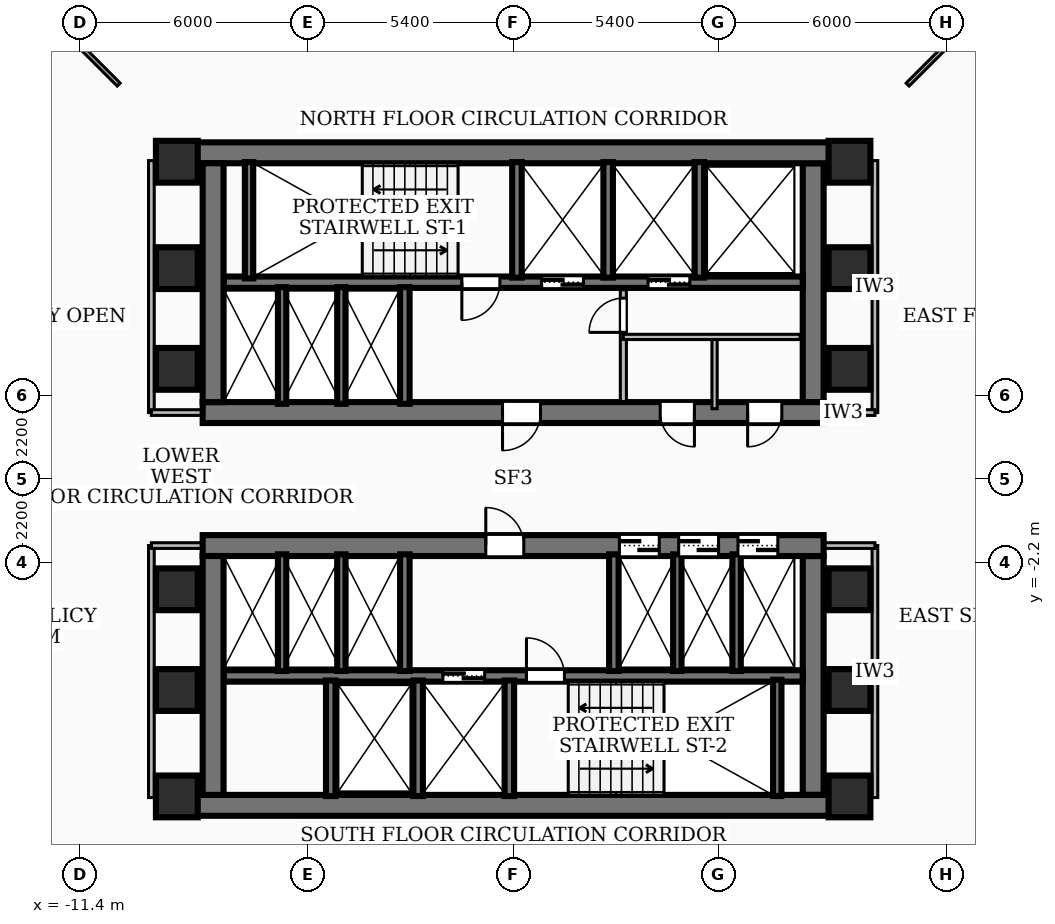
"""IFC4 building model, lengths in metres.
Left out: names, types, materials, properties, quantities, classifications, styles, units other than length and angle.
Written with IfcOpenShell. Run it as: python <this file> out.ifc"""

import sys

from ifc_helpers import new_model, si_unit, direction, frame, frame_2d, origin, origin_2d, place, context, subcontext, project, spatial, rectangle, extrude, element, fill, save


model = new_model("IFC4")
c1 = context("Model", 3, precision=1e-05, world=origin(), true_north=direction((0.0, 1.0)))
c2 = subcontext(c1, "Body", "Model", "MODEL_VIEW")
j1 = project(units=[si_unit("LENGTHUNIT", "METRE"), si_unit("PLANEANGLEUNIT", "RADIAN")], contexts=[c1])
p1 = place(None, origin())
s1 = spatial("IfcSite", under=j1, at=p1, CompositionType="ELEMENT")
p2 = place(p1, origin())
s2 = spatial("IfcBuilding", under=s1, at=p2, CompositionType="ELEMENT")
p3 = place(p2, frame((0.0, 0.0, 31.68)))
s3 = spatial("IfcBuildingStorey", under=s2, at=p3, CompositionType="ELEMENT", Elevation=31.68)
p4 = place(p3, frame((-8.78, 8.585, 0.0), z_axis=(0.0, 0.0, 1.0), x_axis=(1.0, 0.0, 0.0)))
e1 = element("IfcWall", 1, at=p4, inside=s3, PredefinedType="SHEAR", context=c2, shape_type="SweptSolid", body=[
    extrude(rectangle(XDim=17.56, YDim=0.55, at=frame_2d((8.78, 0.0))), origin(), (0.0, 0.0, 1.0), 3.34),
])
p5 = place(p3, frame((8.17, 1.75, 0.0), z_axis=(0.0, 0.0, 1.0), x_axis=(-1.0, 0.0, 0.0)))
e2 = element("IfcWall", 2, at=p5, inside=s3, PredefinedType="SHEAR", context=c2, shape_type="SweptSolid", body=[
    extrude(rectangle(XDim=16.34, YDim=0.55, at=frame_2d((8.17, 0.0))), origin(), (0.0, 0.0, 1.0), 3.34),
])
p6 = place(p5, frame((7.45, 0.0, 0.0)))
e3 = element("IfcOpeningElement", 3, at=p6, cuts=e2, PredefinedType="OPENING", context=c2, shape_type="SweptSolid", body=[
    extrude(rectangle(XDim=1.0, YDim=2.1, at=frame_2d((0.5, 1.05))), frame((0.0, 0.285, 0.0), z_axis=(0.0, -1.0, 0.0), x_axis=(1.0, 0.0, 0.0)), (0.0, 0.0, 1.0), 0.57),
])
p7 = place(p5, frame((3.4, 0.0, 0.0)))
e4 = element("IfcOpeningElement", 4, at=p7, cuts=e2, PredefinedType="OPENING", context=c2, shape_type="SweptSolid", body=[
    extrude(rectangle(XDim=0.9, YDim=2.06, at=frame_2d((0.45, 1.03))), frame((0.0, 0.285, 0.0), z_axis=(0.0, -1.0, 0.0), x_axis=(1.0, 0.0, 0.0)), (0.0, 0.0, 1.0), 0.57),
])
p8 = place(p5, frame((1.1, 0.0, 0.0)))
e5 = element("IfcOpeningElement", 5, at=p8, cuts=e2, PredefinedType="OPENING", context=c2, shape_type="SweptSolid", body=[
    extrude(rectangle(XDim=0.9, YDim=2.06, at=frame_2d((0.45, 1.03))), frame((0.0, 0.285, 0.0), z_axis=(0.0, -1.0, 0.0), x_axis=(1.0, 0.0, 0.0)), (0.0, 0.0, 1.0), 0.57),
])
for number, where, z_axis, x_axis in (
    (6, (-7.895, 2.025, 0.0), (0.0, 0.0, 1.0), (0.0, 1.0, 0.0)),
    (7, (7.895, 8.31, 0.0), (0.0, 0.0, 1.0), (0.0, -1.0, 0.0)),
):
    element("IfcWall", number, at=place(p3, frame(where, z_axis=z_axis, x_axis=x_axis)), inside=s3, PredefinedType="SHEAR", context=c2, shape_type="SweptSolid", body=[
        extrude(rectangle(XDim=6.285, YDim=0.55, at=frame_2d((3.143, 0.0))), origin(), (0.0, 0.0, 1.0), 3.34),
    ])
p9 = place(p3, frame((7.62, 5.18, 0.0), z_axis=(0.0, 0.0, 1.0), x_axis=(-1.0, 0.0, 0.0)))
e8 = element("IfcWall", 8, at=p9, inside=s3, PredefinedType="SOLIDWALL", context=c2, shape_type="SweptSolid", body=[
    extrude(rectangle(XDim=15.24, YDim=0.3, at=frame_2d((7.62, 0.0))), origin(), (0.0, 0.0, 1.0), 3.34),
])
p10 = place(p9, frame((5.77, 0.0, 0.0)))
e9 = element("IfcOpeningElement", 9, at=p10, cuts=e8, PredefinedType="OPENING", context=c2, shape_type="SweptSolid", body=[
    extrude(rectangle(XDim=1.1, YDim=2.15, at=frame_2d((0.55, 1.075))), frame((0.0, 0.16, 0.0), z_axis=(0.0, -1.0, 0.0), x_axis=(1.0, 0.0, 0.0)), (0.0, 0.0, 1.0), 0.32),
])
p11 = place(p9, frame((2.97, 0.0, 0.0)))
e10 = element("IfcOpeningElement", 10, at=p11, cuts=e8, PredefinedType="OPENING", context=c2, shape_type="SweptSolid", body=[
    extrude(rectangle(XDim=1.1, YDim=2.15, at=frame_2d((0.55, 1.075))), frame((0.0, 0.16, 0.0), z_axis=(0.0, -1.0, 0.0), x_axis=(1.0, 0.0, 0.0)), (0.0, 0.0, 1.0), 0.32),
])
p12 = place(p9, frame((7.97, 0.0, 0.0)))
e11 = element("IfcOpeningElement", 11, at=p12, cuts=e8, PredefinedType="OPENING", context=c2, shape_type="SweptSolid", body=[
    extrude(rectangle(XDim=1.0, YDim=2.1, at=frame_2d((0.5, 1.05))), frame((0.0, 0.16, 0.0), z_axis=(0.0, -1.0, 0.0), x_axis=(1.0, 0.0, 0.0)), (0.0, 0.0, 1.0), 0.32),
])
p13 = place(p3, frame((8.78, -8.585, 0.0), z_axis=(0.0, 0.0, 1.0), x_axis=(-1.0, 0.0, 0.0)))
e12 = element("IfcWall", 12, at=p13, inside=s3, PredefinedType="SHEAR", context=c2, shape_type="SweptSolid", body=[
    extrude(rectangle(XDim=17.56, YDim=0.55, at=frame_2d((8.78, 0.0))), origin(), (0.0, 0.0, 1.0), 3.34),
])
p14 = place(p3, frame((-8.17, -1.75, 0.0), z_axis=(0.0, 0.0, 1.0), x_axis=(1.0, 0.0, 0.0)))
e13 = element("IfcWall", 13, at=p14, inside=s3, PredefinedType="SHEAR", context=c2, shape_type="SweptSolid", body=[
    extrude(rectangle(XDim=16.34, YDim=0.55, at=frame_2d((8.17, 0.0))), origin(), (0.0, 0.0, 1.0), 3.34),
])
p15 = place(p14, frame((7.45, 0.0, 0.0)))
e14 = element("IfcOpeningElement", 14, at=p15, cuts=e13, PredefinedType="OPENING", context=c2, shape_type="SweptSolid", body=[
    extrude(rectangle(XDim=1.0, YDim=2.1, at=frame_2d((0.5, 1.05))), frame((0.0, 0.285, 0.0), z_axis=(0.0, -1.0, 0.0), x_axis=(1.0, 0.0, 0.0)), (0.0, 0.0, 1.0), 0.57),
])
p16 = place(p14, frame((10.965, 0.0, 0.0)))
e15 = element("IfcOpeningElement", 15, at=p16, cuts=e13, PredefinedType="OPENING", context=c2, shape_type="SweptSolid", body=[
    extrude(rectangle(XDim=1.05, YDim=2.15, at=frame_2d((0.525, 1.075))), frame((0.0, 0.285, 0.0), z_axis=(0.0, -1.0, 0.0), x_axis=(1.0, 0.0, 0.0)), (0.0, 0.0, 1.0), 0.57),
])
p17 = place(p14, frame((12.525, 0.0, 0.0)))
e16 = element("IfcOpeningElement", 16, at=p17, cuts=e13, PredefinedType="OPENING", context=c2, shape_type="SweptSolid", body=[
    extrude(rectangle(XDim=1.05, YDim=2.15, at=frame_2d((0.525, 1.075))), frame((0.0, 0.285, 0.0), z_axis=(0.0, -1.0, 0.0), x_axis=(1.0, 0.0, 0.0)), (0.0, 0.0, 1.0), 0.57),
])
p18 = place(p14, frame((14.085, 0.0, 0.0)))
e17 = element("IfcOpeningElement", 17, at=p18, cuts=e13, PredefinedType="OPENING", context=c2, shape_type="SweptSolid", body=[
    extrude(rectangle(XDim=1.05, YDim=2.15, at=frame_2d((0.525, 1.075))), frame((0.0, 0.285, 0.0), z_axis=(0.0, -1.0, 0.0), x_axis=(1.0, 0.0, 0.0)), (0.0, 0.0, 1.0), 0.57),
])
for number, where, z_axis, x_axis in (
    (18, (-7.895, -8.31, 0.0), (0.0, 0.0, 1.0), (0.0, 1.0, 0.0)),
    (19, (7.895, -2.025, 0.0), (0.0, 0.0, 1.0), (0.0, -1.0, 0.0)),
):
    element("IfcWall", number, at=place(p3, frame(where, z_axis=z_axis, x_axis=x_axis)), inside=s3, PredefinedType="SHEAR", context=c2, shape_type="SweptSolid", body=[
        extrude(rectangle(XDim=6.285, YDim=0.55, at=frame_2d((3.143, 0.0))), origin(), (0.0, 0.0, 1.0), 3.34),
    ])
p19 = place(p3, frame((-7.62, -5.18, 0.0), z_axis=(0.0, 0.0, 1.0), x_axis=(1.0, 0.0, 0.0)))
e20 = element("IfcWall", 20, at=p19, inside=s3, PredefinedType="SOLIDWALL", context=c2, shape_type="SweptSolid", body=[
    extrude(rectangle(XDim=15.24, YDim=0.3, at=frame_2d((7.62, 0.0))), origin(), (0.0, 0.0, 1.0), 3.34),
])
p20 = place(p19, frame((5.77, 0.0, 0.0)))
e21 = element("IfcOpeningElement", 21, at=p20, cuts=e20, PredefinedType="OPENING", context=c2, shape_type="SweptSolid", body=[
    extrude(rectangle(XDim=1.1, YDim=2.15, at=frame_2d((0.55, 1.075))), frame((0.0, 0.16, 0.0), z_axis=(0.0, -1.0, 0.0), x_axis=(1.0, 0.0, 0.0)), (0.0, 0.0, 1.0), 0.32),
])
p21 = place(p19, frame((7.97, 0.0, 0.0)))
e22 = element("IfcOpeningElement", 22, at=p21, cuts=e20, PredefinedType="OPENING", context=c2, shape_type="SweptSolid", body=[
    extrude(rectangle(XDim=1.0, YDim=2.1, at=frame_2d((0.5, 1.05))), frame((0.0, 0.16, 0.0), z_axis=(0.0, -1.0, 0.0), x_axis=(1.0, 0.0, 0.0)), (0.0, 0.0, 1.0), 0.32),
])
for number, where, z_axis, x_axis in (
    (23, (-6.95, 5.28, 0.0), (0.0, 0.0, 1.0), (0.0, 1.0, 0.0)),
    (24, (6.95, -8.34, 0.0), (0.0, 0.0, 1.0), (0.0, 1.0, 0.0)),
):
    element("IfcWall", number, at=place(p3, frame(where, z_axis=z_axis, x_axis=x_axis)), inside=s3, PredefinedType="SOLIDWALL", context=c2, shape_type="SweptSolid", body=[
        extrude(rectangle(XDim=3.06, YDim=0.22, at=frame_2d((1.53, 0.0))), origin(), (0.0, 0.0, 1.0), 3.34),
    ])
for number, where, z_axis, x_axis in (
    (25, (0.1, 5.3, 0.0), (0.0, 0.0, 1.0), (0.0, 1.0, 0.0)),
    (26, (2.5, 5.3, 0.0), (0.0, 0.0, 1.0), (0.0, 1.0, 0.0)),
    (27, (4.9, 5.3, 0.0), (0.0, 0.0, 1.0), (0.0, 1.0, 0.0)),
):
    element("IfcWall", number, at=place(p3, frame(where, z_axis=z_axis, x_axis=x_axis)), inside=s3, PredefinedType="SOLIDWALL", context=c2, shape_type="SweptSolid", body=[
        extrude(rectangle(XDim=3.04, YDim=0.25, at=frame_2d((1.52, 0.0))), origin(), (0.0, 0.0, 1.0), 3.34),
    ])
p22 = place(p3, frame((-2.85, 1.98, 0.0), z_axis=(0.0, 0.0, 1.0), x_axis=(0.0, 1.0, 0.0)))
e28 = element("IfcWall", 28, at=p22, inside=s3, PredefinedType="SOLIDWALL", context=c2, shape_type="SweptSolid", body=[
    extrude(rectangle(XDim=3.07, YDim=0.25, at=frame_2d((1.535, 0.0))), origin(), (0.0, 0.0, 1.0), 3.34),
])
for number, where, z_axis, x_axis in (
    (29, (-0.1, -8.34, 0.0), (0.0, 0.0, 1.0), (0.0, 1.0, 0.0)),
    (30, (-2.5, -8.34, 0.0), (0.0, 0.0, 1.0), (0.0, 1.0, 0.0)),
    (31, (-4.8, -8.34, 0.0), (0.0, 0.0, 1.0), (0.0, 1.0, 0.0)),
):
    element("IfcWall", number, at=place(p3, frame(where, z_axis=z_axis, x_axis=x_axis)), inside=s3, PredefinedType="SOLIDWALL", context=c2, shape_type="SweptSolid", body=[
        extrude(rectangle(XDim=3.04, YDim=0.25, at=frame_2d((1.52, 0.0))), origin(), (0.0, 0.0, 1.0), 3.34),
    ])
for number, where, z_axis, x_axis in (
    (32, (-2.85, -5.05, 0.0), (0.0, 0.0, 1.0), (0.0, 1.0, 0.0)),
    (33, (2.65, -5.05, 0.0), (0.0, 0.0, 1.0), (0.0, 1.0, 0.0)),
):
    element("IfcWall", number, at=place(p3, frame(where, z_axis=z_axis, x_axis=x_axis)), inside=s3, PredefinedType="SOLIDWALL", context=c2, shape_type="SweptSolid", body=[
        extrude(rectangle(XDim=3.07, YDim=0.25, at=frame_2d((1.535, 0.0))), origin(), (0.0, 0.0, 1.0), 3.34),
    ])
for number, where, z_axis, x_axis in (
    (34, (-6.08, 1.98, 0.0), (0.0, 0.0, 1.0), (0.0, 1.0, 0.0)),
    (35, (-4.52, 1.98, 0.0), (0.0, 0.0, 1.0), (0.0, 1.0, 0.0)),
    (36, (4.32, -5.05, 0.0), (0.0, 0.0, 1.0), (0.0, 1.0, 0.0)),
    (37, (5.88, -5.05, 0.0), (0.0, 0.0, 1.0), (0.0, 1.0, 0.0)),
    (38, (-6.08, -5.05, 0.0), (0.0, 0.0, 1.0), (0.0, 1.0, 0.0)),
    (39, (-4.52, -5.05, 0.0), (0.0, 0.0, 1.0), (0.0, 1.0, 0.0)),
):
    element("IfcWall", number, at=place(p3, frame(where, z_axis=z_axis, x_axis=x_axis)), inside=s3, PredefinedType="SOLIDWALL", context=c2, shape_type="SweptSolid", body=[
        extrude(rectangle(XDim=3.07, YDim=0.22, at=frame_2d((1.535, 0.0))), origin(), (0.0, 0.0, 1.0), 3.34),
    ])
for number, where, z_axis, x_axis in (
    (40, (-8.85, -5.55, 0.0), (0.0, 0.0, 1.0), (1.0, 0.0, 0.0)),
    (41, (-8.85, -2.9, 0.0), (0.0, 0.0, 1.0), (1.0, 0.0, 0.0)),
    (42, (-8.85, 2.9, 0.0), (0.0, 0.0, 1.0), (1.0, 0.0, 0.0)),
    (43, (-8.85, 5.55, 0.0), (0.0, 0.0, 1.0), (1.0, 0.0, 0.0)),
    (44, (8.85, -5.55, 0.0), (0.0, 0.0, 1.0), (1.0, 0.0, 0.0)),
    (45, (8.85, -2.9, 0.0), (0.0, 0.0, 1.0), (1.0, 0.0, 0.0)),
    (46, (8.85, 2.9, 0.0), (0.0, 0.0, 1.0), (1.0, 0.0, 0.0)),
    (47, (8.85, 5.55, 0.0), (0.0, 0.0, 1.0), (1.0, 0.0, 0.0)),
    (48, (-8.85, 8.35, 0.0), (0.0, 0.0, 1.0), (1.0, 0.0, 0.0)),
    (49, (8.85, -8.35, 0.0), (0.0, 0.0, 1.0), (1.0, 0.0, 0.0)),
    (50, (8.85, 8.35, 0.0), (0.0, 0.0, 1.0), (1.0, 0.0, 0.0)),
    (51, (-8.85, -8.35, 0.0), (0.0, 0.0, 1.0), (1.0, 0.0, 0.0)),
):
    element("IfcColumn", number, at=place(p3, frame(where, z_axis=z_axis, x_axis=x_axis)), inside=s3, PredefinedType="COLUMN", context=c2, shape_type="SweptSolid", body=[
        extrude(rectangle(XDim=1.1, YDim=1.1, at=origin_2d()), origin(), (0.0, 0.0, 1.0), 3.6),
    ])
p23 = place(p3, frame((2.9, 2.04, 0.0), z_axis=(0.0, 0.0, 1.0), x_axis=(0.0, 1.0, 0.0)))
e52 = element("IfcWall", 52, at=p23, inside=s3, PredefinedType="PARTITIONING", context=c2, shape_type="SweptSolid", body=[
    extrude(rectangle(XDim=2.94, YDim=0.16, at=frame_2d((1.47, 0.0))), origin(), (0.0, 0.0, 1.0), 2.405),
])
p24 = place(p23, frame((1.82, 0.0, 0.0)))
e53 = element("IfcOpeningElement", 53, at=p24, cuts=e52, PredefinedType="OPENING", context=c2, shape_type="SweptSolid", body=[
    extrude(rectangle(XDim=0.9, YDim=2.06, at=frame_2d((0.45, 1.03))), frame((0.0, 0.09, 0.0), z_axis=(0.0, -1.0, 0.0), x_axis=(1.0, 0.0, 0.0)), (0.0, 0.0, 1.0), 0.18),
])
p25 = place(p3, frame((2.9, 3.74, 0.0), z_axis=(0.0, 0.0, 1.0), x_axis=(1.0, 0.0, 0.0)))
e54 = element("IfcWall", 54, at=p25, inside=s3, PredefinedType="PARTITIONING", context=c2, shape_type="SweptSolid", body=[
    extrude(rectangle(XDim=4.65, YDim=0.138, at=frame_2d((2.325, 0.0))), origin(), (0.0, 0.0, 1.0), 3.34),
])
p26 = place(p3, frame((5.3, 1.85, 0.0), z_axis=(0.0, 0.0, 1.0), x_axis=(0.0, 1.0, 0.0)))
e55 = element("IfcWall", 55, at=p26, inside=s3, PredefinedType="PARTITIONING", context=c2, shape_type="SweptSolid", body=[
    extrude(rectangle(XDim=1.89, YDim=0.138, at=frame_2d((0.945, 0.0))), origin(), (0.0, 0.0, 1.0), 2.405),
])
p27 = place(p3, frame((-9.52, 1.75, 0.0), z_axis=(0.0, 0.0, 1.0), x_axis=(0.0, 1.0, 0.0)))
e56 = element("IfcWall", 56, at=p27, inside=s3, PredefinedType="PARTITIONING", context=c2, shape_type="SweptSolid", body=[
    extrude(rectangle(XDim=6.63, YDim=0.15, at=frame_2d((3.315, 0.0))), origin(), (0.0, 0.0, 1.0), 2.421),
])
p28 = place(p3, frame((-7.85, 1.75, 0.0), z_axis=(0.0, 0.0, 1.0), x_axis=(-1.0, 0.0, 0.0)))
e57 = element("IfcWall", 57, at=p28, inside=s3, PredefinedType="PARTITIONING", context=c2, shape_type="SweptSolid", body=[
    extrude(rectangle(XDim=1.67, YDim=0.15, at=frame_2d((0.835, 0.0))), origin(), (0.0, 0.0, 1.0), 2.405),
])
p29 = place(p3, frame((-9.52, -8.38, 0.0), z_axis=(0.0, 0.0, 1.0), x_axis=(0.0, 1.0, 0.0)))
e58 = element("IfcWall", 58, at=p29, inside=s3, PredefinedType="PARTITIONING", context=c2, shape_type="SweptSolid", body=[
    extrude(rectangle(XDim=6.63, YDim=0.15, at=frame_2d((3.315, 0.0))), origin(), (0.0, 0.0, 1.0), 2.421),
])
p30 = place(p3, frame((-7.85, -1.75, 0.0), z_axis=(0.0, 0.0, 1.0), x_axis=(-1.0, 0.0, 0.0)))
e59 = element("IfcWall", 59, at=p30, inside=s3, PredefinedType="PARTITIONING", context=c2, shape_type="SweptSolid", body=[
    extrude(rectangle(XDim=1.67, YDim=0.15, at=frame_2d((0.835, 0.0))), origin(), (0.0, 0.0, 1.0), 2.405),
])
p31 = place(p3, frame((9.52, 1.75, 0.0), z_axis=(0.0, 0.0, 1.0), x_axis=(0.0, 1.0, 0.0)))
e60 = element("IfcWall", 60, at=p31, inside=s3, PredefinedType="PARTITIONING", context=c2, shape_type="SweptSolid", body=[
    extrude(rectangle(XDim=6.63, YDim=0.15, at=frame_2d((3.315, 0.0))), origin(), (0.0, 0.0, 1.0), 2.421),
])
p32 = place(p3, frame((7.85, 1.75, 0.0), z_axis=(0.0, 0.0, 1.0), x_axis=(1.0, 0.0, 0.0)))
e61 = element("IfcWall", 61, at=p32, inside=s3, PredefinedType="PARTITIONING", context=c2, shape_type="SweptSolid", body=[
    extrude(rectangle(XDim=1.67, YDim=0.15, at=frame_2d((0.835, 0.0))), origin(), (0.0, 0.0, 1.0), 2.405),
])
p33 = place(p3, frame((9.52, -8.38, 0.0), z_axis=(0.0, 0.0, 1.0), x_axis=(0.0, 1.0, 0.0)))
e62 = element("IfcWall", 62, at=p33, inside=s3, PredefinedType="PARTITIONING", context=c2, shape_type="SweptSolid", body=[
    extrude(rectangle(XDim=6.63, YDim=0.15, at=frame_2d((3.315, 0.0))), origin(), (0.0, 0.0, 1.0), 2.421),
])
p34 = place(p3, frame((7.85, -1.75, 0.0), z_axis=(0.0, 0.0, 1.0), x_axis=(1.0, 0.0, 0.0)))
e63 = element("IfcWall", 63, at=p34, inside=s3, PredefinedType="PARTITIONING", context=c2, shape_type="SweptSolid", body=[
    extrude(rectangle(XDim=1.67, YDim=0.15, at=frame_2d((0.835, 0.0))), origin(), (0.0, 0.0, 1.0), 2.405),
])
p35 = place(p3, frame((10.38, 10.38, 0.0), z_axis=(0.0, 0.0, 1.0), x_axis=(0.707106781187, 0.707106781187, 0.0)))
e64 = element("IfcWall", 64, at=p35, inside=s3, PredefinedType="PARTITIONING", context=c2, shape_type="SweptSolid", body=[
    extrude(rectangle(XDim=4.975, YDim=0.11, at=frame_2d((2.488, 0.0))), origin(), (0.0, 0.0, 1.0), 2.644),
])
p36 = place(p3, frame((-10.38, 10.38, 0.0), z_axis=(0.0, 0.0, 1.0), x_axis=(-0.707106781187, 0.707106781187, 0.0)))
e65 = element("IfcWall", 65, at=p36, inside=s3, PredefinedType="PARTITIONING", context=c2, shape_type="SweptSolid", body=[
    extrude(rectangle(XDim=4.975, YDim=0.11, at=frame_2d((2.488, 0.0))), origin(), (0.0, 0.0, 1.0), 3.34),
])
p37 = place(p6, origin())
e66 = element("IfcDoor", 66, at=p37, inside=s3, OperationType="SINGLE_SWING_RIGHT", PredefinedType="DOOR", context=c2, shape_type="SweptSolid", body=[
    extrude(rectangle(XDim=1.0, YDim=2.1, at=frame_2d((0.5, 1.05))), frame((0.0, 0.025, 0.0), z_axis=(0.0, -1.0, 0.0), x_axis=(1.0, 0.0, 0.0)), (0.0, 0.0, 1.0), 0.05),
])
fill(e3, e66)
p38 = place(p15, origin())
e67 = element("IfcDoor", 67, at=p38, inside=s3, OperationType="SINGLE_SWING_LEFT", PredefinedType="DOOR", context=c2, shape_type="SweptSolid", body=[
    extrude(rectangle(XDim=1.0, YDim=2.1, at=frame_2d((0.5, 1.05))), frame((0.0, 0.025, 0.0), z_axis=(0.0, -1.0, 0.0), x_axis=(1.0, 0.0, 0.0)), (0.0, 0.0, 1.0), 0.05),
])
fill(e14, e67)
p39 = place(p10, origin())
e68 = element("IfcDoor", 68, at=p39, inside=s3, OperationType="DOUBLE_DOOR_SLIDING", PredefinedType="DOOR", context=c2, shape_type="SweptSolid", body=[
    extrude(rectangle(XDim=1.1, YDim=2.15, at=frame_2d((0.55, 1.075))), frame((0.0, 0.025, 0.0), z_axis=(0.0, -1.0, 0.0), x_axis=(1.0, 0.0, 0.0)), (0.0, 0.0, 1.0), 0.05),
])
fill(e9, e68)
p40 = place(p11, origin())
e69 = element("IfcDoor", 69, at=p40, inside=s3, OperationType="DOUBLE_DOOR_SLIDING", PredefinedType="DOOR", context=c2, shape_type="SweptSolid", body=[
    extrude(rectangle(XDim=1.1, YDim=2.15, at=frame_2d((0.55, 1.075))), frame((0.0, 0.025, 0.0), z_axis=(0.0, -1.0, 0.0), x_axis=(1.0, 0.0, 0.0)), (0.0, 0.0, 1.0), 0.05),
])
fill(e10, e69)
p41 = place(p12, origin())
e70 = element("IfcDoor", 70, at=p41, inside=s3, OperationType="SINGLE_SWING_RIGHT", PredefinedType="DOOR", context=c2, shape_type="SweptSolid", body=[
    extrude(rectangle(XDim=1.0, YDim=2.1, at=frame_2d((0.5, 1.05))), frame((0.0, 0.025, 0.0), z_axis=(0.0, -1.0, 0.0), x_axis=(1.0, 0.0, 0.0)), (0.0, 0.0, 1.0), 0.05),
])
fill(e11, e70)
p42 = place(p20, origin())
e71 = element("IfcDoor", 71, at=p42, inside=s3, OperationType="DOUBLE_DOOR_SLIDING", PredefinedType="DOOR", context=c2, shape_type="SweptSolid", body=[
    extrude(rectangle(XDim=1.1, YDim=2.15, at=frame_2d((0.55, 1.075))), frame((0.0, 0.025, 0.0), z_axis=(0.0, -1.0, 0.0), x_axis=(1.0, 0.0, 0.0)), (0.0, 0.0, 1.0), 0.05),
])
fill(e21, e71)
p43 = place(p21, origin())
e72 = element("IfcDoor", 72, at=p43, inside=s3, OperationType="SINGLE_SWING_LEFT", PredefinedType="DOOR", context=c2, shape_type="SweptSolid", body=[
    extrude(rectangle(XDim=1.0, YDim=2.1, at=frame_2d((0.5, 1.05))), frame((0.0, 0.025, 0.0), z_axis=(0.0, -1.0, 0.0), x_axis=(1.0, 0.0, 0.0)), (0.0, 0.0, 1.0), 0.05),
])
fill(e22, e72)
p44 = place(p16, origin())
e73 = element("IfcDoor", 73, at=p44, inside=s3, OperationType="DOUBLE_DOOR_SLIDING", PredefinedType="DOOR", context=c2, shape_type="SweptSolid", body=[
    extrude(rectangle(XDim=1.05, YDim=2.15, at=frame_2d((0.525, 1.075))), frame((0.0, 0.025, 0.0), z_axis=(0.0, -1.0, 0.0), x_axis=(1.0, 0.0, 0.0)), (0.0, 0.0, 1.0), 0.05),
])
fill(e15, e73)
p45 = place(p17, origin())
e74 = element("IfcDoor", 74, at=p45, inside=s3, OperationType="DOUBLE_DOOR_SLIDING", PredefinedType="DOOR", context=c2, shape_type="SweptSolid", body=[
    extrude(rectangle(XDim=1.05, YDim=2.15, at=frame_2d((0.525, 1.075))), frame((0.0, 0.025, 0.0), z_axis=(0.0, -1.0, 0.0), x_axis=(1.0, 0.0, 0.0)), (0.0, 0.0, 1.0), 0.05),
])
fill(e16, e74)
p46 = place(p18, origin())
e75 = element("IfcDoor", 75, at=p46, inside=s3, OperationType="DOUBLE_DOOR_SLIDING", PredefinedType="DOOR", context=c2, shape_type="SweptSolid", body=[
    extrude(rectangle(XDim=1.05, YDim=2.15, at=frame_2d((0.525, 1.075))), frame((0.0, 0.025, 0.0), z_axis=(0.0, -1.0, 0.0), x_axis=(1.0, 0.0, 0.0)), (0.0, 0.0, 1.0), 0.05),
])
fill(e17, e75)
p47 = place(p7, origin())
e76 = element("IfcDoor", 76, at=p47, inside=s3, OperationType="SINGLE_SWING_LEFT", PredefinedType="DOOR", context=c2, shape_type="SweptSolid", body=[
    extrude(rectangle(XDim=0.9, YDim=2.06, at=frame_2d((0.45, 1.03))), frame((0.0, 0.025, 0.0), z_axis=(0.0, -1.0, 0.0), x_axis=(1.0, 0.0, 0.0)), (0.0, 0.0, 1.0), 0.05),
])
fill(e4, e76)
p48 = place(p8, origin())
e77 = element("IfcDoor", 77, at=p48, inside=s3, OperationType="SINGLE_SWING_RIGHT", PredefinedType="DOOR", context=c2, shape_type="SweptSolid", body=[
    extrude(rectangle(XDim=0.9, YDim=2.06, at=frame_2d((0.45, 1.03))), frame((0.0, 0.025, 0.0), z_axis=(0.0, -1.0, 0.0), x_axis=(1.0, 0.0, 0.0)), (0.0, 0.0, 1.0), 0.05),
])
fill(e5, e77)
p49 = place(p24, origin())
e78 = element("IfcDoor", 78, at=p49, inside=s3, OperationType="SINGLE_SWING_LEFT", PredefinedType="DOOR", context=c2, shape_type="SweptSolid", body=[
    extrude(rectangle(XDim=0.9, YDim=2.06, at=frame_2d((0.45, 1.03))), frame((0.0, 0.025, 0.0), z_axis=(0.0, -1.0, 0.0), x_axis=(1.0, 0.0, 0.0)), (0.0, 0.0, 1.0), 0.05),
])
fill(e53, e78)
save(model, sys.argv[1])
